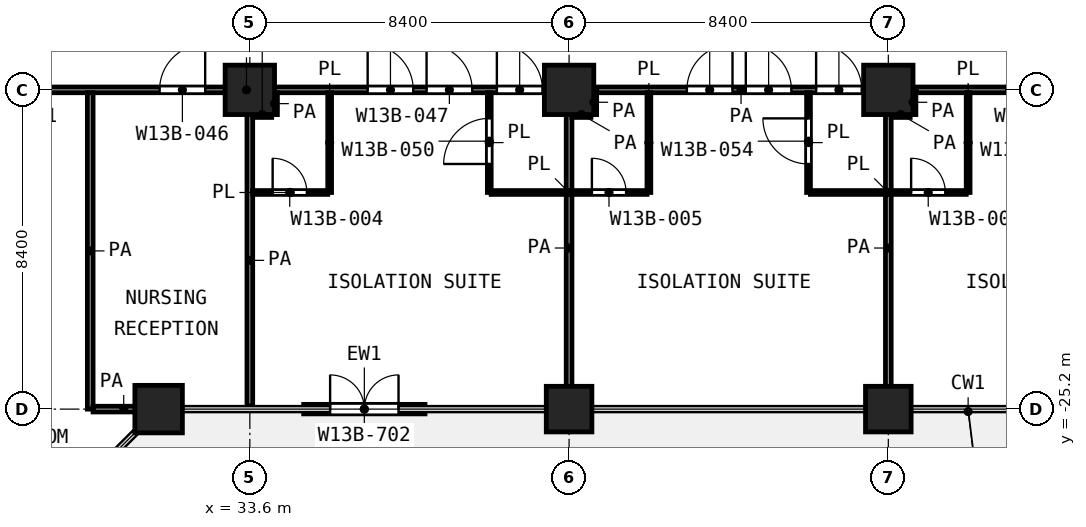
"""IFC4 building model, lengths in metres.
Left out: names, types, materials, properties, quantities, classifications, styles, units other than length and angle.
Written with IfcOpenShell. Run it as: python <this file> out.ifc"""

import sys

from ifc_helpers import new_model, si_unit, direction, frame, frame_2d, origin, origin_2d, place, context, subcontext, project, spatial, rectangle, extrude, element, fill, save


model = new_model("IFC4")
c1 = context("Model", 3, precision=1e-05, world=origin(), true_north=direction((0.0, 1.0)))
c2 = subcontext(c1, "Body", "Model", "MODEL_VIEW")
j1 = project(units=[si_unit("LENGTHUNIT", "METRE"), si_unit("PLANEANGLEUNIT", "RADIAN")], contexts=[c1])
p1 = place(None, origin())
s1 = spatial("IfcSite", under=j1, at=p1, CompositionType="ELEMENT")
p2 = place(p1, origin())
s2 = spatial("IfcBuilding", under=s1, at=p2, CompositionType="ELEMENT")
p3 = place(p2, frame((0.0, 0.0, 89.6)))
s3 = spatial("IfcBuildingStorey", under=s2, at=p3, CompositionType="ELEMENT", Elevation=89.6)
for number, where, z_axis, x_axis in (
    (1, (33.6, -16.8, 0.0), (0.0, 0.0, 1.0), (1.0, 0.0, 0.0)),
    (2, (42.0, -16.8, 0.0), (0.0, 0.0, 1.0), (1.0, 0.0, 0.0)),
    (3, (50.4, -16.8, 0.0), (0.0, 0.0, 1.0), (1.0, 0.0, 0.0)),
):
    element("IfcColumn", number, at=place(p3, frame(where, z_axis=z_axis, x_axis=x_axis)), inside=s3, PredefinedType="COLUMN", context=c2, shape_type="SweptSolid", body=[
        extrude(rectangle(XDim=1.3, YDim=1.3, at=origin_2d()), origin(), (0.0, 0.0, 1.0), 4.2),
    ])
p4 = place(p3, frame((31.2, -25.2, 0.0), z_axis=(0.0, 0.0, 1.0), x_axis=(1.0, 0.0, 0.0)))
e4 = element("IfcColumn", 4, at=p4, inside=s3, PredefinedType="COLUMN", context=c2, shape_type="SweptSolid", body=[
    extrude(rectangle(XDim=1.25, YDim=1.25, at=origin_2d()), origin(), (0.0, 0.0, 1.0), 4.2),
])
for number, where, z_axis, x_axis in (
    (5, (42.0, -25.2, 0.0), (0.0, 0.0, 1.0), (1.0, 0.0, 0.0)),
    (6, (50.4, -25.2, 0.0), (0.0, 0.0, 1.0), (1.0, 0.0, 0.0)),
):
    element("IfcColumn", number, at=place(p3, frame(where, z_axis=z_axis, x_axis=x_axis)), inside=s3, PredefinedType="COLUMN", context=c2, shape_type="SweptSolid", body=[
        extrude(rectangle(XDim=1.2, YDim=1.2, at=origin_2d()), origin(), (0.0, 0.0, 1.0), 4.2),
    ])
p5 = place(p3, frame((35.017, -25.2, 0.0), z_axis=(0.0, 0.0, 1.0), x_axis=(1.0, 0.0, 0.0)))
e7 = element("IfcWall", 7, at=p5, inside=s3, PredefinedType="SOLIDWALL", context=c2, shape_type="SweptSolid", body=[
    extrude(rectangle(XDim=3.192, YDim=0.25, at=frame_2d((1.596, 0.0))), origin(), (0.0, 0.0, 1.0), 3.58),
])
p6 = place(p5, frame((0.696, 0.0, 0.0)))
e8 = element("IfcOpeningElement", 8, at=p6, cuts=e7, PredefinedType="OPENING", context=c2, shape_type="SweptSolid", body=[
    extrude(rectangle(XDim=1.8, YDim=2.1, at=frame_2d((0.9, 1.05))), frame((0.0, 0.135, 0.0), z_axis=(0.0, -1.0, 0.0), x_axis=(1.0, 0.0, 0.0)), (0.0, 0.0, 1.0), 0.27),
])
p7 = place(p3, frame((33.675, -19.5, 0.0), z_axis=(0.0, 0.0, 1.0), x_axis=(1.0, 0.0, 0.0)))
e9 = element("IfcWall", 9, at=p7, inside=s3, PredefinedType="PARTITIONING", context=c2, shape_type="SweptSolid", body=[
    extrude(rectangle(XDim=1.975, YDim=0.1, at=frame_2d((0.987, 0.0))), origin(), (0.0, 0.0, 1.0), 3.7),
])
p8 = place(p7, frame((0.525, 0.0, 0.0)))
e10 = element("IfcOpeningElement", 10, at=p8, cuts=e9, PredefinedType="OPENING", context=c2, shape_type="SweptSolid", body=[
    extrude(rectangle(XDim=0.9, YDim=2.1, at=frame_2d((0.45, 1.05))), frame((0.0, 0.06, 0.0), z_axis=(0.0, -1.0, 0.0), x_axis=(1.0, 0.0, 0.0)), (0.0, 0.0, 1.0), 0.12),
])
p9 = place(p3, frame((39.95, -19.5, 0.0), z_axis=(0.0, 0.0, 1.0), x_axis=(1.0, 0.0, 0.0)))
e11 = element("IfcWall", 11, at=p9, inside=s3, PredefinedType="PARTITIONING", context=c2, shape_type="SweptSolid", body=[
    extrude(rectangle(XDim=4.1, YDim=0.1, at=frame_2d((2.05, 0.0))), origin(), (0.0, 0.0, 1.0), 3.7),
])
p10 = place(p9, frame((2.65, 0.0, 0.0)))
e12 = element("IfcOpeningElement", 12, at=p10, cuts=e11, PredefinedType="OPENING", context=c2, shape_type="SweptSolid", body=[
    extrude(rectangle(XDim=0.9, YDim=2.1, at=frame_2d((0.45, 1.05))), frame((0.0, 0.06, 0.0), z_axis=(0.0, -1.0, 0.0), x_axis=(1.0, 0.0, 0.0)), (0.0, 0.0, 1.0), 0.12),
])
p11 = place(p3, frame((48.35, -19.5, 0.0), z_axis=(0.0, 0.0, 1.0), x_axis=(1.0, 0.0, 0.0)))
e13 = element("IfcWall", 13, at=p11, inside=s3, PredefinedType="PARTITIONING", context=c2, shape_type="SweptSolid", body=[
    extrude(rectangle(XDim=4.1, YDim=0.1, at=frame_2d((2.05, 0.0))), origin(), (0.0, 0.0, 1.0), 3.7),
])
p12 = place(p11, frame((2.65, 0.0, 0.0)))
e14 = element("IfcOpeningElement", 14, at=p12, cuts=e13, PredefinedType="OPENING", context=c2, shape_type="SweptSolid", body=[
    extrude(rectangle(XDim=0.9, YDim=2.1, at=frame_2d((0.45, 1.05))), frame((0.0, 0.06, 0.0), z_axis=(0.0, -1.0, 0.0), x_axis=(1.0, 0.0, 0.0)), (0.0, 0.0, 1.0), 0.12),
])
p13 = place(p3, frame((35.7, -19.5, 0.0), z_axis=(0.0, 0.0, 1.0), x_axis=(0.0, 1.0, 0.0)))
e15 = element("IfcWall", 15, at=p13, inside=s3, PredefinedType="PARTITIONING", context=c2, shape_type="SweptSolid", body=[
    extrude(rectangle(XDim=2.625, YDim=0.1, at=frame_2d((1.312, 0.0))), origin(), (0.0, 0.0, 1.0), 3.7),
])
p14 = place(p3, frame((39.9, -19.5, 0.0), z_axis=(0.0, 0.0, 1.0), x_axis=(0.0, 1.0, 0.0)))
e16 = element("IfcWall", 16, at=p14, inside=s3, PredefinedType="PARTITIONING", context=c2, shape_type="SweptSolid", body=[
    extrude(rectangle(XDim=2.625, YDim=0.1, at=frame_2d((1.312, 0.0))), origin(), (0.0, 0.0, 1.0), 3.7),
])
p15 = place(p14, frame((0.75, 0.0, 0.0)))
e17 = element("IfcOpeningElement", 17, at=p15, cuts=e16, PredefinedType="OPENING", context=c2, shape_type="SweptSolid", body=[
    extrude(rectangle(XDim=1.2, YDim=2.1, at=frame_2d((0.6, 1.05))), frame((0.0, 0.06, 0.0), z_axis=(0.0, -1.0, 0.0), x_axis=(1.0, 0.0, 0.0)), (0.0, 0.0, 1.0), 0.12),
])
p16 = place(p3, frame((44.1, -19.5, 0.0), z_axis=(0.0, 0.0, 1.0), x_axis=(0.0, 1.0, 0.0)))
e18 = element("IfcWall", 18, at=p16, inside=s3, PredefinedType="PARTITIONING", context=c2, shape_type="SweptSolid", body=[
    extrude(rectangle(XDim=2.625, YDim=0.1, at=frame_2d((1.312, 0.0))), origin(), (0.0, 0.0, 1.0), 3.7),
])
p17 = place(p3, frame((48.3, -19.5, 0.0), z_axis=(0.0, 0.0, 1.0), x_axis=(0.0, 1.0, 0.0)))
e19 = element("IfcWall", 19, at=p17, inside=s3, PredefinedType="PARTITIONING", context=c2, shape_type="SweptSolid", body=[
    extrude(rectangle(XDim=2.625, YDim=0.1, at=frame_2d((1.312, 0.0))), origin(), (0.0, 0.0, 1.0), 3.7),
])
p18 = place(p17, frame((0.75, 0.0, 0.0)))
e20 = element("IfcOpeningElement", 20, at=p18, cuts=e19, PredefinedType="OPENING", context=c2, shape_type="SweptSolid", body=[
    extrude(rectangle(XDim=1.2, YDim=2.1, at=frame_2d((0.6, 1.05))), frame((0.0, 0.06, 0.0), z_axis=(0.0, -1.0, 0.0), x_axis=(1.0, 0.0, 0.0)), (0.0, 0.0, 1.0), 0.12),
])
p19 = place(p3, frame((52.5, -19.5, 0.0), z_axis=(0.0, 0.0, 1.0), x_axis=(0.0, 1.0, 0.0)))
e21 = element("IfcWall", 21, at=p19, inside=s3, PredefinedType="PARTITIONING", context=c2, shape_type="SweptSolid", body=[
    extrude(rectangle(XDim=2.625, YDim=0.1, at=frame_2d((1.312, 0.0))), origin(), (0.0, 0.0, 1.0), 3.7),
])
p20 = place(p3, frame((29.475, -25.2, 0.0), z_axis=(0.0, 0.0, 1.0), x_axis=(1.0, 0.0, 0.0)))
e22 = element("IfcWall", 22, at=p20, inside=s3, PredefinedType="PARTITIONING", context=c2, shape_type="SweptSolid", body=[
    extrude(rectangle(XDim=1.612, YDim=0.15, at=frame_2d((0.806, 0.0))), origin(), (0.0, 0.0, 1.0), 3.7),
])
p21 = place(p3, frame((33.677, -17.45, 0.0), z_axis=(0.0, 0.0, 1.0), x_axis=(1.0, 0.0, 0.0)))
e23 = element("IfcWall", 23, at=p21, inside=s3, PredefinedType="PARTITIONING", context=c2, shape_type="SweptSolid", body=[
    extrude(rectangle(XDim=0.498, YDim=0.15, at=frame_2d((0.249, 0.0))), origin(), (0.0, 0.0, 1.0), 3.7),
])
for number, where, z_axis, x_axis in (
    (24, (42.075, -17.45, 0.0), (0.0, 0.0, 1.0), (1.0, 0.0, 0.0)),
    (25, (50.475, -17.45, 0.0), (0.0, 0.0, 1.0), (1.0, 0.0, 0.0)),
):
    element("IfcWall", number, at=place(p3, frame(where, z_axis=z_axis, x_axis=x_axis)), inside=s3, PredefinedType="PARTITIONING", context=c2, shape_type="SweptSolid", body=[
        extrude(rectangle(XDim=0.5, YDim=0.15, at=frame_2d((0.25, 0.0))), origin(), (0.0, 0.0, 1.0), 3.7),
    ])
p22 = place(p3, frame((25.1, -16.8, 0.0), z_axis=(0.0, 0.0, 1.0), x_axis=(1.0, 0.0, 0.0)))
e26 = element("IfcWall", 26, at=p22, inside=s3, PredefinedType="PARTITIONING", context=c2, shape_type="SweptSolid", body=[
    extrude(rectangle(XDim=16.823, YDim=0.15, at=frame_2d((8.412, 0.0))), origin(), (0.0, 0.0, 1.0), 3.7),
])
p23 = place(p22, frame((1.7, 0.0, 0.0)))
e27 = element("IfcOpeningElement", 27, at=p23, cuts=e26, PredefinedType="OPENING", context=c2, shape_type="SweptSolid", body=[
    extrude(rectangle(XDim=1.0, YDim=2.1, at=frame_2d((0.5, 1.05))), frame((0.0, 0.085, 0.0), z_axis=(0.0, -1.0, 0.0), x_axis=(1.0, 0.0, 0.0)), (0.0, 0.0, 1.0), 0.17),
])
p24 = place(p22, frame((6.125, 0.0, 0.0)))
e28 = element("IfcOpeningElement", 28, at=p24, cuts=e26, PredefinedType="OPENING", context=c2, shape_type="SweptSolid", body=[
    extrude(rectangle(XDim=1.2, YDim=2.1, at=frame_2d((0.6, 1.05))), frame((0.0, 0.085, 0.0), z_axis=(0.0, -1.0, 0.0), x_axis=(1.0, 0.0, 0.0)), (0.0, 0.0, 1.0), 0.17),
])
p25 = place(p22, frame((13.15, 0.0, 0.0)))
e29 = element("IfcOpeningElement", 29, at=p25, cuts=e26, PredefinedType="OPENING", context=c2, shape_type="SweptSolid", body=[
    extrude(rectangle(XDim=1.2, YDim=2.1, at=frame_2d((0.6, 1.05))), frame((0.0, 0.085, 0.0), z_axis=(0.0, -1.0, 0.0), x_axis=(1.0, 0.0, 0.0)), (0.0, 0.0, 1.0), 0.17),
])
p26 = place(p22, frame((11.6, 0.0, 0.0)))
e30 = element("IfcOpeningElement", 30, at=p26, cuts=e26, PredefinedType="OPENING", context=c2, shape_type="SweptSolid", body=[
    extrude(rectangle(XDim=1.2, YDim=2.1, at=frame_2d((0.6, 1.05))), frame((0.0, 0.085, 0.0), z_axis=(0.0, -1.0, 0.0), x_axis=(1.0, 0.0, 0.0)), (0.0, 0.0, 1.0), 0.17),
])
p27 = place(p22, frame((15.0, 0.0, 0.0)))
e31 = element("IfcOpeningElement", 31, at=p27, cuts=e26, PredefinedType="OPENING", context=c2, shape_type="SweptSolid", body=[
    extrude(rectangle(XDim=1.2, YDim=2.1, at=frame_2d((0.6, 1.05))), frame((0.0, 0.085, 0.0), z_axis=(0.0, -1.0, 0.0), x_axis=(1.0, 0.0, 0.0)), (0.0, 0.0, 1.0), 0.17),
])
p28 = place(p3, frame((42.727, -16.8, 0.0), z_axis=(0.0, 0.0, 1.0), x_axis=(1.0, 0.0, 0.0)))
e32 = element("IfcWall", 32, at=p28, inside=s3, PredefinedType="PARTITIONING", context=c2, shape_type="SweptSolid", body=[
    extrude(rectangle(XDim=7.595, YDim=0.15, at=frame_2d((3.797, 0.0))), origin(), (0.0, 0.0, 1.0), 3.7),
])
p29 = place(p28, frame((3.923, 0.0, 0.0)))
e33 = element("IfcOpeningElement", 33, at=p29, cuts=e32, PredefinedType="OPENING", context=c2, shape_type="SweptSolid", body=[
    extrude(rectangle(XDim=1.2, YDim=2.1, at=frame_2d((0.6, 1.05))), frame((0.0, 0.085, 0.0), z_axis=(0.0, -1.0, 0.0), x_axis=(1.0, 0.0, 0.0)), (0.0, 0.0, 1.0), 0.17),
])
p30 = place(p28, frame((2.373, 0.0, 0.0)))
e34 = element("IfcOpeningElement", 34, at=p30, cuts=e32, PredefinedType="OPENING", context=c2, shape_type="SweptSolid", body=[
    extrude(rectangle(XDim=1.2, YDim=2.1, at=frame_2d((0.6, 1.05))), frame((0.0, 0.085, 0.0), z_axis=(0.0, -1.0, 0.0), x_axis=(1.0, 0.0, 0.0)), (0.0, 0.0, 1.0), 0.17),
])
p31 = place(p28, frame((5.773, 0.0, 0.0)))
e35 = element("IfcOpeningElement", 35, at=p31, cuts=e32, PredefinedType="OPENING", context=c2, shape_type="SweptSolid", body=[
    extrude(rectangle(XDim=1.2, YDim=2.1, at=frame_2d((0.6, 1.05))), frame((0.0, 0.085, 0.0), z_axis=(0.0, -1.0, 0.0), x_axis=(1.0, 0.0, 0.0)), (0.0, 0.0, 1.0), 0.17),
])
p32 = place(p3, frame((51.128, -16.8, 0.0), z_axis=(0.0, 0.0, 1.0), x_axis=(1.0, 0.0, 0.0)))
e36 = element("IfcWall", 36, at=p32, inside=s3, PredefinedType="PARTITIONING", context=c2, shape_type="SweptSolid", body=[
    extrude(rectangle(XDim=7.594, YDim=0.15, at=frame_2d((3.797, 0.0))), origin(), (0.0, 0.0, 1.0), 3.7),
])
p33 = place(p32, frame((3.922, 0.0, 0.0)))
e37 = element("IfcOpeningElement", 37, at=p33, cuts=e36, PredefinedType="OPENING", context=c2, shape_type="SweptSolid", body=[
    extrude(rectangle(XDim=1.2, YDim=2.1, at=frame_2d((0.6, 1.05))), frame((0.0, 0.085, 0.0), z_axis=(0.0, -1.0, 0.0), x_axis=(1.0, 0.0, 0.0)), (0.0, 0.0, 1.0), 0.17),
])
p34 = place(p32, frame((2.372, 0.0, 0.0)))
e38 = element("IfcOpeningElement", 38, at=p34, cuts=e36, PredefinedType="OPENING", context=c2, shape_type="SweptSolid", body=[
    extrude(rectangle(XDim=1.2, YDim=2.1, at=frame_2d((0.6, 1.05))), frame((0.0, 0.085, 0.0), z_axis=(0.0, -1.0, 0.0), x_axis=(1.0, 0.0, 0.0)), (0.0, 0.0, 1.0), 0.17),
])
p35 = place(p32, frame((5.772, 0.0, 0.0)))
e39 = element("IfcOpeningElement", 39, at=p35, cuts=e36, PredefinedType="OPENING", context=c2, shape_type="SweptSolid", body=[
    extrude(rectangle(XDim=1.2, YDim=2.1, at=frame_2d((0.6, 1.05))), frame((0.0, 0.085, 0.0), z_axis=(0.0, -1.0, 0.0), x_axis=(1.0, 0.0, 0.0)), (0.0, 0.0, 1.0), 0.17),
])
p36 = place(p3, frame((29.4, -25.2, 0.0), z_axis=(0.0, 0.0, 1.0), x_axis=(0.0, 1.0, 0.0)))
e40 = element("IfcWall", 40, at=p36, inside=s3, PredefinedType="PARTITIONING", context=c2, shape_type="SweptSolid", body=[
    extrude(rectangle(XDim=8.325, YDim=0.15, at=frame_2d((4.163, 0.0))), origin(), (0.0, 0.0, 1.0), 3.7),
])
p37 = place(p3, frame((33.6, -25.12, 0.0), z_axis=(0.0, 0.0, 1.0), x_axis=(0.0, 1.0, 0.0)))
e41 = element("IfcWall", 41, at=p37, inside=s3, PredefinedType="PARTITIONING", context=c2, shape_type="SweptSolid", body=[
    extrude(rectangle(XDim=7.668, YDim=0.15, at=frame_2d((3.834, 0.0))), origin(), (0.0, 0.0, 1.0), 3.7),
])
p38 = place(p3, frame((34.25, -17.45, 0.0), z_axis=(0.0, 0.0, 1.0), x_axis=(0.0, 1.0, 0.0)))
e42 = element("IfcWall", 42, at=p38, inside=s3, PredefinedType="PARTITIONING", context=c2, shape_type="SweptSolid", body=[
    extrude(rectangle(XDim=0.575, YDim=0.15, at=frame_2d((0.288, 0.0))), origin(), (0.0, 0.0, 1.0), 3.7),
])
p39 = place(p3, frame((42.0, -25.12, 0.0), z_axis=(0.0, 0.0, 1.0), x_axis=(0.0, 1.0, 0.0)))
e43 = element("IfcWall", 43, at=p39, inside=s3, PredefinedType="PARTITIONING", context=c2, shape_type="SweptSolid", body=[
    extrude(rectangle(XDim=8.318, YDim=0.15, at=frame_2d((4.159, 0.0))), origin(), (0.0, 0.0, 1.0), 3.7),
])
p40 = place(p3, frame((42.65, -17.45, 0.0), z_axis=(0.0, 0.0, 1.0), x_axis=(0.0, 1.0, 0.0)))
e44 = element("IfcWall", 44, at=p40, inside=s3, PredefinedType="PARTITIONING", context=c2, shape_type="SweptSolid", body=[
    extrude(rectangle(XDim=0.648, YDim=0.15, at=frame_2d((0.324, 0.0))), origin(), (0.0, 0.0, 1.0), 3.7),
])
p41 = place(p3, frame((50.4, -25.12, 0.0), z_axis=(0.0, 0.0, 1.0), x_axis=(0.0, 1.0, 0.0)))
e45 = element("IfcWall", 45, at=p41, inside=s3, PredefinedType="PARTITIONING", context=c2, shape_type="SweptSolid", body=[
    extrude(rectangle(XDim=8.317, YDim=0.15, at=frame_2d((4.159, 0.0))), origin(), (0.0, 0.0, 1.0), 3.7),
])
p42 = place(p3, frame((51.05, -17.45, 0.0), z_axis=(0.0, 0.0, 1.0), x_axis=(0.0, 1.0, 0.0)))
e46 = element("IfcWall", 46, at=p42, inside=s3, PredefinedType="PARTITIONING", context=c2, shape_type="SweptSolid", body=[
    extrude(rectangle(XDim=0.647, YDim=0.15, at=frame_2d((0.323, 0.0))), origin(), (0.0, 0.0, 1.0), 3.7),
])
p43 = place(p6, origin())
e47 = element("IfcDoor", 47, at=p43, inside=s3, OperationType="DOUBLE_DOOR_SINGLE_SWING", PredefinedType="DOOR", context=c2, shape_type="SweptSolid", body=[
    extrude(rectangle(XDim=1.8, YDim=2.1, at=frame_2d((0.9, 1.05))), frame((0.0, 0.025, 0.0), z_axis=(0.0, -1.0, 0.0), x_axis=(1.0, 0.0, 0.0)), (0.0, 0.0, 1.0), 0.05),
])
fill(e8, e47)
p44 = place(p24, origin())
e48 = element("IfcDoor", 48, at=p44, inside=s3, OperationType="SINGLE_SWING_RIGHT", PredefinedType="DOOR", context=c2, shape_type="SweptSolid", body=[
    extrude(rectangle(XDim=1.2, YDim=2.1, at=frame_2d((0.6, 1.05))), frame((0.0, 0.025, 0.0), z_axis=(0.0, -1.0, 0.0), x_axis=(1.0, 0.0, 0.0)), (0.0, 0.0, 1.0), 0.05),
])
fill(e28, e48)
p45 = place(p25, origin())
e49 = element("IfcDoor", 49, at=p45, inside=s3, OperationType="SINGLE_SWING_LEFT", PredefinedType="DOOR", context=c2, shape_type="SweptSolid", body=[
    extrude(rectangle(XDim=1.2, YDim=2.1, at=frame_2d((0.6, 1.05))), frame((0.0, 0.025, 0.0), z_axis=(0.0, -1.0, 0.0), x_axis=(1.0, 0.0, 0.0)), (0.0, 0.0, 1.0), 0.05),
])
fill(e29, e49)
p46 = place(p26, origin())
e50 = element("IfcDoor", 50, at=p46, inside=s3, OperationType="SINGLE_SWING_LEFT", PredefinedType="DOOR", context=c2, shape_type="SweptSolid", body=[
    extrude(rectangle(XDim=1.2, YDim=2.1, at=frame_2d((0.6, 1.05))), frame((0.0, 0.025, 0.0), z_axis=(0.0, -1.0, 0.0), x_axis=(1.0, 0.0, 0.0)), (0.0, 0.0, 1.0), 0.05),
])
fill(e30, e50)
p47 = place(p27, origin())
e51 = element("IfcDoor", 51, at=p47, inside=s3, OperationType="SINGLE_SWING_LEFT", PredefinedType="DOOR", context=c2, shape_type="SweptSolid", body=[
    extrude(rectangle(XDim=1.2, YDim=2.1, at=frame_2d((0.6, 1.05))), frame((0.0, 0.025, 0.0), z_axis=(0.0, -1.0, 0.0), x_axis=(1.0, 0.0, 0.0)), (0.0, 0.0, 1.0), 0.05),
])
fill(e31, e51)
p48 = place(p15, origin())
e52 = element("IfcDoor", 52, at=p48, inside=s3, OperationType="SINGLE_SWING_LEFT", PredefinedType="DOOR", context=c2, shape_type="SweptSolid", body=[
    extrude(rectangle(XDim=1.2, YDim=2.1, at=frame_2d((0.6, 1.05))), frame((0.0, 0.025, 0.0), z_axis=(0.0, -1.0, 0.0), x_axis=(1.0, 0.0, 0.0)), (0.0, 0.0, 1.0), 0.05),
])
fill(e17, e52)
p49 = place(p8, origin())
e53 = element("IfcDoor", 53, at=p49, inside=s3, OperationType="SINGLE_SWING_LEFT", PredefinedType="DOOR", context=c2, shape_type="SweptSolid", body=[
    extrude(rectangle(XDim=0.9, YDim=2.1, at=frame_2d((0.45, 1.05))), frame((0.0, 0.025, 0.0), z_axis=(0.0, -1.0, 0.0), x_axis=(1.0, 0.0, 0.0)), (0.0, 0.0, 1.0), 0.05),
])
fill(e10, e53)
p50 = place(p29, origin())
e54 = element("IfcDoor", 54, at=p50, inside=s3, OperationType="SINGLE_SWING_LEFT", PredefinedType="DOOR", context=c2, shape_type="SweptSolid", body=[
    extrude(rectangle(XDim=1.2, YDim=2.1, at=frame_2d((0.6, 1.05))), frame((0.0, 0.025, 0.0), z_axis=(0.0, -1.0, 0.0), x_axis=(1.0, 0.0, 0.0)), (0.0, 0.0, 1.0), 0.05),
])
fill(e33, e54)
p51 = place(p30, origin())
e55 = element("IfcDoor", 55, at=p51, inside=s3, OperationType="SINGLE_SWING_RIGHT", PredefinedType="DOOR", context=c2, shape_type="SweptSolid", body=[
    extrude(rectangle(XDim=1.2, YDim=2.1, at=frame_2d((0.6, 1.05))), frame((0.0, 0.025, 0.0), z_axis=(0.0, -1.0, 0.0), x_axis=(1.0, 0.0, 0.0)), (0.0, 0.0, 1.0), 0.05),
])
fill(e34, e55)
p52 = place(p31, origin())
e56 = element("IfcDoor", 56, at=p52, inside=s3, OperationType="SINGLE_SWING_LEFT", PredefinedType="DOOR", context=c2, shape_type="SweptSolid", body=[
    extrude(rectangle(XDim=1.2, YDim=2.1, at=frame_2d((0.6, 1.05))), frame((0.0, 0.025, 0.0), z_axis=(0.0, -1.0, 0.0), x_axis=(1.0, 0.0, 0.0)), (0.0, 0.0, 1.0), 0.05),
])
fill(e35, e56)
p53 = place(p18, origin())
e57 = element("IfcDoor", 57, at=p53, inside=s3, OperationType="SINGLE_SWING_RIGHT", PredefinedType="DOOR", context=c2, shape_type="SweptSolid", body=[
    extrude(rectangle(XDim=1.2, YDim=2.1, at=frame_2d((0.6, 1.05))), frame((0.0, 0.025, 0.0), z_axis=(0.0, -1.0, 0.0), x_axis=(1.0, 0.0, 0.0)), (0.0, 0.0, 1.0), 0.05),
])
fill(e20, e57)
p54 = place(p10, origin())
e58 = element("IfcDoor", 58, at=p54, inside=s3, OperationType="SINGLE_SWING_LEFT", PredefinedType="DOOR", context=c2, shape_type="SweptSolid", body=[
    extrude(rectangle(XDim=0.9, YDim=2.1, at=frame_2d((0.45, 1.05))), frame((0.0, 0.025, 0.0), z_axis=(0.0, -1.0, 0.0), x_axis=(1.0, 0.0, 0.0)), (0.0, 0.0, 1.0), 0.05),
])
fill(e12, e58)
p55 = place(p12, origin())
e59 = element("IfcDoor", 59, at=p55, inside=s3, OperationType="SINGLE_SWING_LEFT", PredefinedType="DOOR", context=c2, shape_type="SweptSolid", body=[
    extrude(rectangle(XDim=0.9, YDim=2.1, at=frame_2d((0.45, 1.05))), frame((0.0, 0.025, 0.0), z_axis=(0.0, -1.0, 0.0), x_axis=(1.0, 0.0, 0.0)), (0.0, 0.0, 1.0), 0.05),
])
fill(e14, e59)
save(model, sys.argv[1])
